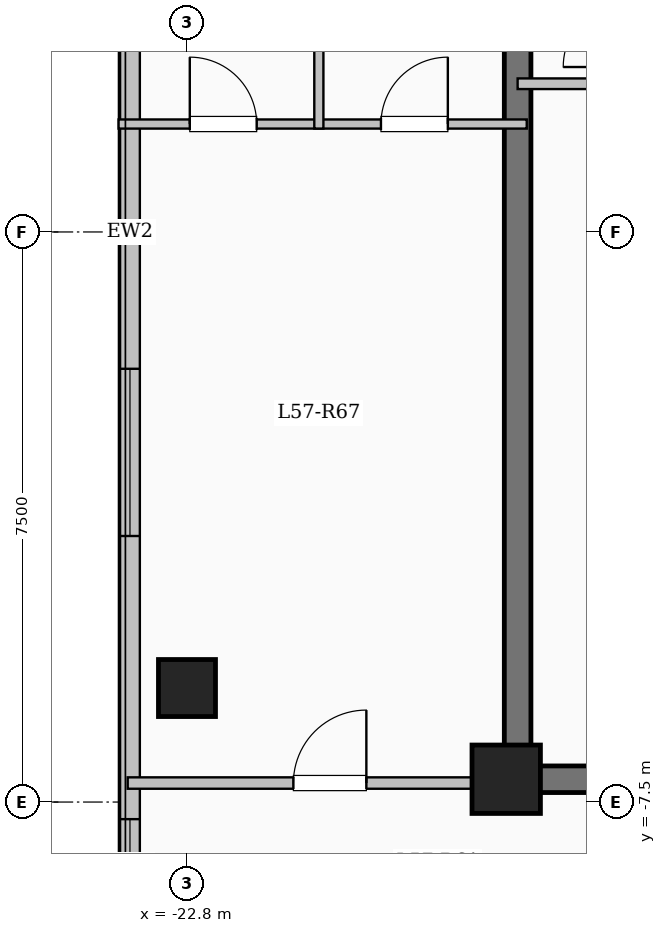
"""IFC4 building model, lengths in metres.
Left out: names, types, materials, properties, quantities, classifications, styles, units other than length and angle.
Written with IfcOpenShell. Run it as: python <this file> out.ifc"""

import sys

from ifc_helpers import new_model, si_unit, direction, frame, frame_2d, origin, origin_2d, place, context, subcontext, project, spatial, rectangle, extrude, element, fill, save


model = new_model("IFC4")
c1 = context("Model", 3, precision=1e-05, world=origin(), true_north=direction((0.0, 1.0)))
c2 = subcontext(c1, "Body", "Model", "MODEL_VIEW")
j1 = project(units=[si_unit("LENGTHUNIT", "METRE"), si_unit("PLANEANGLEUNIT", "RADIAN")], contexts=[c1])
p1 = place(None, origin())
s1 = spatial("IfcSite", under=j1, at=p1, CompositionType="ELEMENT")
p2 = place(p1, origin())
s2 = spatial("IfcBuilding", under=s1, at=p2, CompositionType="ELEMENT")
p3 = place(p2, frame((0.0, 0.0, 210.35)))
s3 = spatial("IfcBuildingStorey", under=s2, at=p3, CompositionType="ELEMENT", Elevation=210.35)
p4 = place(p3, frame((-18.6, -7.2, 0.0), z_axis=(0.0, 0.0, 1.0), x_axis=(1.0, 0.0, 0.0)))
e1 = element("IfcColumn", 1, at=p4, inside=s3, PredefinedType="COLUMN", context=c2, shape_type="SweptSolid", body=[
    extrude(rectangle(XDim=0.9, YDim=0.9, at=origin_2d()), origin(), (0.0, 0.0, 1.0), 3.35),
])
p5 = place(p3, frame((-22.8, -6.0, 0.0), z_axis=(0.0, 0.0, 1.0), x_axis=(1.0, 0.0, 0.0)))
e2 = element("IfcColumn", 2, at=p5, inside=s3, PredefinedType="COLUMN", context=c2, shape_type="SweptSolid", body=[
    extrude(rectangle(XDim=0.75, YDim=0.75, at=origin_2d()), origin(), (0.0, 0.0, 1.0), 3.35),
])
p6 = place(p3, frame((-23.55, -17.25, 0.0), z_axis=(0.0, 0.0, 1.0), x_axis=(0.0, 1.0, 0.0)))
e3 = element("IfcWall", 3, at=p6, inside=s3, PredefinedType="SOLIDWALL", context=c2, shape_type="SweptSolid", body=[
    extrude(rectangle(XDim=34.5, YDim=0.26, at=frame_2d((17.25, 0.0))), origin(), (0.0, 0.0, 1.0), 3.1),
])
p7 = place(p6, frame((2.825, 0.0, 0.9)))
e4 = element("IfcOpeningElement", 4, at=p7, cuts=e3, PredefinedType="OPENING", context=c2, shape_type="SweptSolid", body=[
    extrude(rectangle(XDim=2.2, YDim=1.75, at=frame_2d((1.1, 0.875))), frame((0.0, 0.14, 0.0), z_axis=(0.0, -1.0, 0.0), x_axis=(1.0, 0.0, 0.0)), (0.0, 0.0, 1.0), 0.28),
])
p8 = place(p6, frame((8.325, 0.0, 0.95)))
e5 = element("IfcOpeningElement", 5, at=p8, cuts=e3, PredefinedType="OPENING", context=c2, shape_type="SweptSolid", body=[
    extrude(rectangle(XDim=1.2, YDim=1.5, at=frame_2d((0.6, 0.75))), frame((0.0, 0.14, 0.0), z_axis=(0.0, -1.0, 0.0), x_axis=(1.0, 0.0, 0.0)), (0.0, 0.0, 1.0), 0.28),
])
p9 = place(p6, frame((13.25, 0.0, 0.9)))
e6 = element("IfcOpeningElement", 6, at=p9, cuts=e3, PredefinedType="OPENING", context=c2, shape_type="SweptSolid", body=[
    extrude(rectangle(XDim=2.2, YDim=1.75, at=frame_2d((1.1, 0.875))), frame((0.0, 0.14, 0.0), z_axis=(0.0, -1.0, 0.0), x_axis=(1.0, 0.0, 0.0)), (0.0, 0.0, 1.0), 0.28),
])
p10 = place(p6, frame((19.65, 0.0, 0.9)))
e7 = element("IfcOpeningElement", 7, at=p10, cuts=e3, PredefinedType="OPENING", context=c2, shape_type="SweptSolid", body=[
    extrude(rectangle(XDim=1.65, YDim=1.6, at=frame_2d((0.825, 0.8))), frame((0.0, 0.14, 0.0), z_axis=(0.0, -1.0, 0.0), x_axis=(1.0, 0.0, 0.0)), (0.0, 0.0, 1.0), 0.28),
])
p11 = place(p6, frame((24.125, 0.0, 0.9)))
e8 = element("IfcOpeningElement", 8, at=p11, cuts=e3, PredefinedType="OPENING", context=c2, shape_type="SweptSolid", body=[
    extrude(rectangle(XDim=2.0, YDim=1.7, at=frame_2d((1.0, 0.85))), frame((0.0, 0.14, 0.0), z_axis=(0.0, -1.0, 0.0), x_axis=(1.0, 0.0, 0.0)), (0.0, 0.0, 1.0), 0.28),
])
p12 = place(p6, frame((28.375, 0.0, 0.95)))
e9 = element("IfcOpeningElement", 9, at=p12, cuts=e3, PredefinedType="OPENING", context=c2, shape_type="SweptSolid", body=[
    extrude(rectangle(XDim=1.0, YDim=1.5, at=frame_2d((0.5, 0.75))), frame((0.0, 0.14, 0.0), z_axis=(0.0, -1.0, 0.0), x_axis=(1.0, 0.0, 0.0)), (0.0, 0.0, 1.0), 0.28),
])
p13 = place(p6, frame((31.125, 0.0, 0.9)))
e10 = element("IfcOpeningElement", 10, at=p13, cuts=e3, PredefinedType="OPENING", context=c2, shape_type="SweptSolid", body=[
    extrude(rectangle(XDim=2.0, YDim=1.7, at=frame_2d((1.0, 0.85))), frame((0.0, 0.14, 0.0), z_axis=(0.0, -1.0, 0.0), x_axis=(1.0, 0.0, 0.0)), (0.0, 0.0, 1.0), 0.28),
])
p14 = place(p3, frame((-18.45, -7.375, 0.0), z_axis=(0.0, 0.0, 1.0), x_axis=(0.0, 1.0, 0.0)))
e11 = element("IfcWall", 11, at=p14, inside=s3, PredefinedType="SHEAR", context=c2, shape_type="SweptSolid", body=[
    extrude(rectangle(XDim=14.05, YDim=0.35, at=frame_2d((7.025, 0.0))), origin(), (0.0, 0.0, 1.0), 3.35),
])
p15 = place(p3, frame((-18.625, -7.2, 0.0), z_axis=(0.0, 0.0, 1.0), x_axis=(1.0, 0.0, 0.0)))
e12 = element("IfcWall", 12, at=p15, inside=s3, PredefinedType="SHEAR", context=c2, shape_type="SweptSolid", body=[
    extrude(rectangle(XDim=6.0, YDim=0.35, at=frame_2d((3.0, 0.0))), origin(), (0.0, 0.0, 1.0), 3.35),
])
p16 = place(p15, frame((1.725, 0.0, 0.0)))
e13 = element("IfcOpeningElement", 13, at=p16, cuts=e12, PredefinedType="OPENING", context=c2, shape_type="SweptSolid", body=[
    extrude(rectangle(XDim=1.12, YDim=2.15, at=frame_2d((0.56, 1.075))), frame((0.0, 0.185, 0.0), z_axis=(0.0, -1.0, 0.0), x_axis=(1.0, 0.0, 0.0)), (0.0, 0.0, 1.0), 0.37),
])
p17 = place(p3, frame((-18.45, 1.95, 0.0), z_axis=(0.0, 0.0, 1.0), x_axis=(1.0, 0.0, 0.0)))
e14 = element("IfcWall", 14, at=p17, inside=s3, PredefinedType="PARTITIONING", context=c2, shape_type="SweptSolid", body=[
    extrude(rectangle(XDim=3.15, YDim=0.14, at=frame_2d((1.575, 0.0))), origin(), (0.0, 0.0, 1.0), 3.1),
])
p18 = place(p17, frame((1.9, 0.0, 0.0)))
e15 = element("IfcOpeningElement", 15, at=p18, cuts=e14, PredefinedType="OPENING", context=c2, shape_type="SweptSolid", body=[
    extrude(rectangle(XDim=0.9, YDim=2.08, at=frame_2d((0.45, 1.04))), frame((0.0, 0.08, 0.0), z_axis=(0.0, -1.0, 0.0), x_axis=(1.0, 0.0, 0.0)), (0.0, 0.0, 1.0), 0.16),
])
p19 = place(p3, frame((-23.58, -7.25, 0.0), z_axis=(0.0, 0.0, 1.0), x_axis=(1.0, 0.0, 0.0)))
e16 = element("IfcWall", 16, at=p19, inside=s3, PredefinedType="PARTITIONING", context=c2, shape_type="SweptSolid", body=[
    extrude(rectangle(XDim=5.13, YDim=0.15, at=frame_2d((2.565, 0.0))), origin(), (0.0, 0.0, 1.0), 3.1),
])
p20 = place(p19, frame((2.18, 0.0, 0.0)))
e17 = element("IfcOpeningElement", 17, at=p20, cuts=e16, PredefinedType="OPENING", context=c2, shape_type="SweptSolid", body=[
    extrude(rectangle(XDim=0.96, YDim=2.15, at=frame_2d((0.48, 1.075))), frame((0.0, 0.085, 0.0), z_axis=(0.0, -1.0, 0.0), x_axis=(1.0, 0.0, 0.0)), (0.0, 0.0, 1.0), 0.17),
])
p21 = place(p3, frame((-23.7, 1.42, 0.0), z_axis=(0.0, 0.0, 1.0), x_axis=(1.0, 0.0, 0.0)))
e18 = element("IfcWall", 18, at=p21, inside=s3, PredefinedType="PARTITIONING", context=c2, shape_type="SweptSolid", body=[
    extrude(rectangle(XDim=5.37, YDim=0.12, at=frame_2d((2.685, 0.0))), origin(), (0.0, 0.0, 1.0), 3.1),
])
p22 = place(p21, frame((0.937, 0.0, 0.0)))
e19 = element("IfcOpeningElement", 19, at=p22, cuts=e18, PredefinedType="OPENING", context=c2, shape_type="SweptSolid", body=[
    extrude(rectangle(XDim=0.88, YDim=2.1, at=frame_2d((0.44, 1.05))), frame((0.0, 0.07, 0.0), z_axis=(0.0, -1.0, 0.0), x_axis=(1.0, 0.0, 0.0)), (0.0, 0.0, 1.0), 0.14),
])
p23 = place(p21, frame((3.452, 0.0, 0.0)))
e20 = element("IfcOpeningElement", 20, at=p23, cuts=e18, PredefinedType="OPENING", context=c2, shape_type="SweptSolid", body=[
    extrude(rectangle(XDim=0.88, YDim=2.1, at=frame_2d((0.44, 1.05))), frame((0.0, 0.07, 0.0), z_axis=(0.0, -1.0, 0.0), x_axis=(1.0, 0.0, 0.0)), (0.0, 0.0, 1.0), 0.14),
])
p24 = place(p3, frame((-21.065, 1.36, 0.0), z_axis=(0.0, 0.0, 1.0), x_axis=(0.0, 1.0, 0.0)))
e21 = element("IfcWall", 21, at=p24, inside=s3, PredefinedType="PARTITIONING", context=c2, shape_type="SweptSolid", body=[
    extrude(rectangle(XDim=3.58, YDim=0.12, at=frame_2d((1.79, 0.0))), origin(), (0.0, 0.0, 1.0), 3.1),
])
p25 = place(p8, origin())
e22 = element("IfcWindow", 22, at=p25, inside=s3, PartitioningType="SINGLE_PANEL", PredefinedType="WINDOW", context=c2, shape_type="SweptSolid", body=[
    extrude(rectangle(XDim=1.2, YDim=1.5, at=frame_2d((0.6, 0.75))), frame((0.0, 0.03, 0.0), z_axis=(0.0, -1.0, 0.0), x_axis=(1.0, 0.0, 0.0)), (0.0, 0.0, 1.0), 0.06),
])
fill(e5, e22)
p26 = place(p9, origin())
e23 = element("IfcWindow", 23, at=p26, inside=s3, PartitioningType="SINGLE_PANEL", PredefinedType="WINDOW", context=c2, shape_type="SweptSolid", body=[
    extrude(rectangle(XDim=2.2, YDim=1.75, at=frame_2d((1.1, 0.875))), frame((0.0, 0.03, 0.0), z_axis=(0.0, -1.0, 0.0), x_axis=(1.0, 0.0, 0.0)), (0.0, 0.0, 1.0), 0.06),
])
fill(e6, e23)
p27 = place(p20, origin())
e24 = element("IfcDoor", 24, at=p27, inside=s3, OperationType="SINGLE_SWING_RIGHT", PredefinedType="DOOR", context=c2, shape_type="SweptSolid", body=[
    extrude(rectangle(XDim=0.96, YDim=2.15, at=frame_2d((0.48, 1.075))), frame((0.0, 0.025, 0.0), z_axis=(0.0, -1.0, 0.0), x_axis=(1.0, 0.0, 0.0)), (0.0, 0.0, 1.0), 0.05),
])
fill(e17, e24)
p28 = place(p22, origin())
e25 = element("IfcDoor", 25, at=p28, inside=s3, OperationType="SINGLE_SWING_LEFT", PredefinedType="DOOR", context=c2, shape_type="SweptSolid", body=[
    extrude(rectangle(XDim=0.88, YDim=2.1, at=frame_2d((0.44, 1.05))), frame((0.0, 0.025, 0.0), z_axis=(0.0, -1.0, 0.0), x_axis=(1.0, 0.0, 0.0)), (0.0, 0.0, 1.0), 0.05),
])
fill(e19, e25)
p29 = place(p23, origin())
e26 = element("IfcDoor", 26, at=p29, inside=s3, OperationType="SINGLE_SWING_RIGHT", PredefinedType="DOOR", context=c2, shape_type="SweptSolid", body=[
    extrude(rectangle(XDim=0.88, YDim=2.1, at=frame_2d((0.44, 1.05))), frame((0.0, 0.025, 0.0), z_axis=(0.0, -1.0, 0.0), x_axis=(1.0, 0.0, 0.0)), (0.0, 0.0, 1.0), 0.05),
])
fill(e20, e26)
save(model, sys.argv[1])
